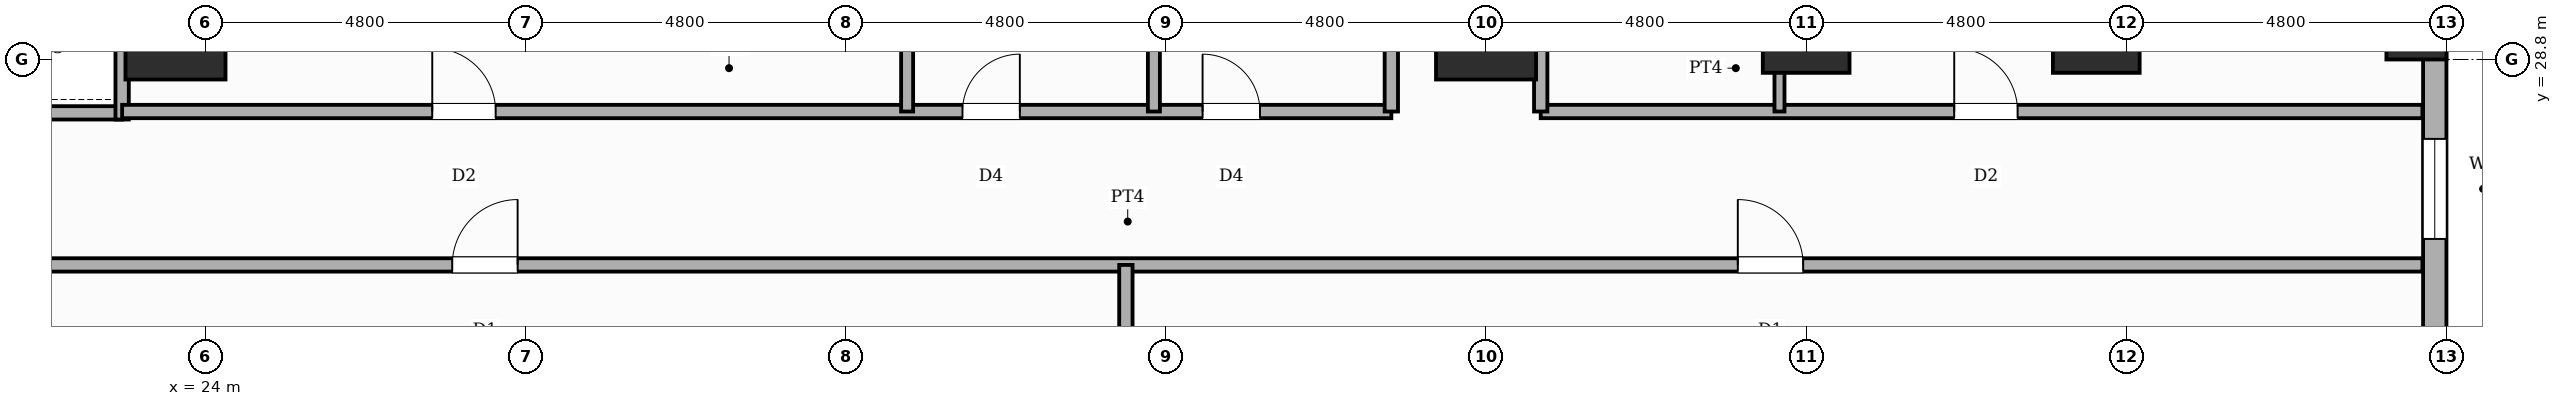
"""IFC4 building model, lengths in metres.
Left out: names, types, materials, properties, quantities, classifications, styles, units other than length and angle.
Written with IfcOpenShell. Run it as: python <this file> out.ifc"""

import sys

from ifc_helpers import new_model, si_unit, direction, frame, frame_2d, origin, origin_2d, place, context, subcontext, project, spatial, rectangle, circle, extrude, element, fill, save


model = new_model("IFC4")
c1 = context("Model", 3, precision=1e-05, world=origin(), true_north=direction((0.0, 1.0)))
c2 = subcontext(c1, "Body", "Model", "MODEL_VIEW")
j1 = project(units=[si_unit("LENGTHUNIT", "METRE"), si_unit("PLANEANGLEUNIT", "RADIAN")], contexts=[c1])
p1 = place(None, origin())
s1 = spatial("IfcSite", under=j1, at=p1, CompositionType="ELEMENT")
p2 = place(p1, origin())
s2 = spatial("IfcBuilding", under=s1, at=p2, CompositionType="ELEMENT")
p3 = place(p2, frame((0.0, 0.0, 14.8)))
s3 = spatial("IfcBuildingStorey", under=s2, at=p3, CompositionType="ELEMENT", Elevation=14.8)
for number, where, z_axis, x_axis in (
    (1, (23.55, 29.25, 0.0), (0.0, 0.0, 1.0), (1.0, 0.0, 0.0)),
    (2, (43.2, 29.25, 0.0), (0.0, 0.0, 1.0), (1.0, 0.0, 0.0)),
):
    element("IfcColumn", number, at=place(p3, frame(where, z_axis=z_axis, x_axis=x_axis)), inside=s3, PredefinedType="USERDEFINED", context=c2, shape_type="SweptSolid", body=[
        extrude(rectangle(XDim=1.5, YDim=1.5, at=origin_2d()), origin(), (0.0, 0.0, 1.0), 4.8),
    ])
for number, where, z_axis, x_axis in (
    (3, (48.0, 29.25, 0.0), (0.0, 0.0, 1.0), (1.0, 0.0, 0.0)),
    (4, (52.35, 29.25, 0.0), (0.0, 0.0, 1.0), (1.0, 0.0, 0.0)),
):
    element("IfcColumn", number, at=place(p3, frame(where, z_axis=z_axis, x_axis=x_axis)), inside=s3, PredefinedType="COLUMN", context=c2, shape_type="SweptSolid", body=[
        extrude(rectangle(XDim=1.3, YDim=1.3, at=origin_2d()), origin(), (0.0, 0.0, 1.0), 4.8),
    ])
p4 = place(p3, frame((57.15, 29.25, 0.0), z_axis=(0.0, 0.0, 1.0), x_axis=(1.0, 0.0, 0.0)))
e5 = element("IfcColumn", 5, at=p4, inside=s3, PredefinedType="COLUMN", context=c2, shape_type="SweptSolid", body=[
    extrude(circle(Radius=0.45, at=origin_2d()), origin(), (0.0, 0.0, 1.0), 4.8),
])
p5 = place(p3, frame((57.425, 48.0, 0.0), z_axis=(0.0, 0.0, 1.0), x_axis=(0.0, -1.0, 0.0)))
e6 = element("IfcWall", 6, at=p5, inside=s3, PredefinedType="STANDARD", context=c2, shape_type="SweptSolid", body=[
    extrude(rectangle(XDim=38.4, YDim=0.35, at=frame_2d((19.2, 0.0))), origin(), (0.0, 0.0, 1.0), 3.48),
])
p6 = place(p5, frame((20.39, 0.0, 0.85)))
e7 = element("IfcOpeningElement", 7, at=p6, cuts=e6, PredefinedType="OPENING", context=c2, shape_type="SweptSolid", body=[
    extrude(rectangle(XDim=1.5, YDim=2.1, at=frame_2d((0.75, 1.05))), frame((0.0, 0.185, 0.0), z_axis=(0.0, -1.0, 0.0), x_axis=(1.0, 0.0, 0.0)), (0.0, 0.0, 1.0), 0.37),
])
p7 = place(p5, frame((2.0, 0.0, 0.85)))
e8 = element("IfcOpeningElement", 8, at=p7, cuts=e6, PredefinedType="OPENING", context=c2, shape_type="SweptSolid", body=[
    extrude(rectangle(XDim=1.5, YDim=2.1, at=frame_2d((0.75, 1.05))), frame((0.0, 0.185, 0.0), z_axis=(0.0, -1.0, 0.0), x_axis=(1.0, 0.0, 0.0)), (0.0, 0.0, 1.0), 0.37),
])
p8 = place(p5, frame((24.585, 0.0, 0.85)))
e9 = element("IfcOpeningElement", 9, at=p8, cuts=e6, PredefinedType="OPENING", context=c2, shape_type="SweptSolid", body=[
    extrude(rectangle(XDim=1.5, YDim=2.1, at=frame_2d((0.75, 1.05))), frame((0.0, 0.185, 0.0), z_axis=(0.0, -1.0, 0.0), x_axis=(1.0, 0.0, 0.0)), (0.0, 0.0, 1.0), 0.37),
])
p9 = place(p3, frame((15.5, 28.0, 0.0), z_axis=(0.0, 0.0, 1.0), x_axis=(1.0, 0.0, 0.0)))
e10 = element("IfcWall", 10, at=p9, inside=s3, PredefinedType="POLYGONAL", context=c2, shape_type="SweptSolid", body=[
    extrude(rectangle(XDim=7.25, YDim=0.2, at=frame_2d((3.625, 0.0))), origin(), (0.0, 0.0, 1.0), 4.4),
])
p10 = place(p3, frame((22.75, 27.9, 0.0), z_axis=(0.0, 0.0, 1.0), x_axis=(0.0, 1.0, 0.0)))
e11 = element("IfcWall", 11, at=p10, inside=s3, PredefinedType="POLYGONAL", context=c2, shape_type="SweptSolid", body=[
    extrude(rectangle(XDim=3.0, YDim=0.2, at=frame_2d((1.5, 0.0))), origin(), (0.0, 0.0, 1.0), 4.4),
])
p11 = place(p3, frame((0.36, 25.72, 0.0), z_axis=(0.0, 0.0, 1.0), x_axis=(1.0, 0.0, 0.0)))
e12 = element("IfcWall", 12, at=p11, inside=s3, PredefinedType="PARTITIONING", context=c2, shape_type="SweptSolid", body=[
    extrude(rectangle(XDim=56.88, YDim=0.2, at=frame_2d((28.44, 0.0))), origin(), (0.0, 0.0, 1.0), 4.4),
])
p12 = place(p11, frame((8.665, 0.0, 0.0)))
e13 = element("IfcOpeningElement", 13, at=p12, cuts=e12, PredefinedType="OPENING", context=c2, shape_type="SweptSolid", body=[
    extrude(rectangle(XDim=0.98, YDim=2.18, at=frame_2d((0.49, 1.09))), frame((0.0, 0.11, 0.0), z_axis=(0.0, -1.0, 0.0), x_axis=(1.0, 0.0, 0.0)), (0.0, 0.0, 1.0), 0.22),
])
p13 = place(p11, frame((27.34, 0.0, 0.0)))
e14 = element("IfcOpeningElement", 14, at=p13, cuts=e12, PredefinedType="OPENING", context=c2, shape_type="SweptSolid", body=[
    extrude(rectangle(XDim=0.98, YDim=2.18, at=frame_2d((0.49, 1.09))), frame((0.0, 0.11, 0.0), z_axis=(0.0, -1.0, 0.0), x_axis=(1.0, 0.0, 0.0)), (0.0, 0.0, 1.0), 0.22),
])
p14 = place(p11, frame((46.615, 0.0, 0.0)))
e15 = element("IfcOpeningElement", 15, at=p14, cuts=e12, PredefinedType="OPENING", context=c2, shape_type="SweptSolid", body=[
    extrude(rectangle(XDim=0.98, YDim=2.18, at=frame_2d((0.49, 1.09))), frame((0.0, 0.11, 0.0), z_axis=(0.0, -1.0, 0.0), x_axis=(1.0, 0.0, 0.0)), (0.0, 0.0, 1.0), 0.22),
])
p15 = place(p3, frame((22.75, 28.02, 0.0), z_axis=(0.0, 0.0, 1.0), x_axis=(1.0, 0.0, 0.0)))
e16 = element("IfcWall", 16, at=p15, inside=s3, PredefinedType="PARTITIONING", context=c2, shape_type="SweptSolid", body=[
    extrude(rectangle(XDim=19.03, YDim=0.2, at=frame_2d((9.515, 0.0))), origin(), (0.0, 0.0, 1.0), 4.4),
])
p16 = place(p15, frame((4.65, 0.0, 0.0)))
e17 = element("IfcOpeningElement", 17, at=p16, cuts=e16, PredefinedType="OPENING", context=c2, shape_type="SweptSolid", body=[
    extrude(rectangle(XDim=0.95, YDim=2.15, at=frame_2d((0.475, 1.075))), frame((0.0, 0.11, 0.0), z_axis=(0.0, -1.0, 0.0), x_axis=(1.0, 0.0, 0.0)), (0.0, 0.0, 1.0), 0.22),
])
p17 = place(p15, frame((12.6, 0.0, 0.0)))
e18 = element("IfcOpeningElement", 18, at=p17, cuts=e16, PredefinedType="OPENING", context=c2, shape_type="SweptSolid", body=[
    extrude(rectangle(XDim=0.86, YDim=2.1, at=frame_2d((0.43, 1.05))), frame((0.0, 0.11, 0.0), z_axis=(0.0, -1.0, 0.0), x_axis=(1.0, 0.0, 0.0)), (0.0, 0.0, 1.0), 0.22),
])
p18 = place(p15, frame((16.2, 0.0, 0.0)))
e19 = element("IfcOpeningElement", 19, at=p18, cuts=e16, PredefinedType="OPENING", context=c2, shape_type="SweptSolid", body=[
    extrude(rectangle(XDim=0.86, YDim=2.1, at=frame_2d((0.43, 1.05))), frame((0.0, 0.11, 0.0), z_axis=(0.0, -1.0, 0.0), x_axis=(1.0, 0.0, 0.0)), (0.0, 0.0, 1.0), 0.22),
])
p19 = place(p3, frame((44.02, 28.02, 0.0), z_axis=(0.0, 0.0, 1.0), x_axis=(1.0, 0.0, 0.0)))
e20 = element("IfcWall", 20, at=p19, inside=s3, PredefinedType="PARTITIONING", context=c2, shape_type="SweptSolid", body=[
    extrude(rectangle(XDim=13.22, YDim=0.2, at=frame_2d((6.61, 0.0))), origin(), (0.0, 0.0, 1.0), 4.4),
])
p20 = place(p19, frame((6.2, 0.0, 0.0)))
e21 = element("IfcOpeningElement", 21, at=p20, cuts=e20, PredefinedType="OPENING", context=c2, shape_type="SweptSolid", body=[
    extrude(rectangle(XDim=0.95, YDim=2.15, at=frame_2d((0.475, 1.075))), frame((0.0, 0.11, 0.0), z_axis=(0.0, -1.0, 0.0), x_axis=(1.0, 0.0, 0.0)), (0.0, 0.0, 1.0), 0.22),
])
p21 = place(p3, frame((41.78, 28.02, 0.0), z_axis=(0.0, 0.0, 1.0), x_axis=(0.0, 1.0, 0.0)))
e22 = element("IfcWall", 22, at=p21, inside=s3, PredefinedType="PARTITIONING", context=c2, shape_type="SweptSolid", body=[
    extrude(rectangle(XDim=10.28, YDim=0.2, at=frame_2d((5.14, 0.0))), origin(), (0.0, 0.0, 1.0), 4.4),
])
p22 = place(p21, frame((9.0, 0.0, 0.0)))
e23 = element("IfcOpeningElement", 23, at=p22, cuts=e22, PredefinedType="OPENING", context=c2, shape_type="SweptSolid", body=[
    extrude(rectangle(XDim=0.95, YDim=2.15, at=frame_2d((0.475, 1.075))), frame((0.0, 0.11, 0.0), z_axis=(0.0, -1.0, 0.0), x_axis=(1.0, 0.0, 0.0)), (0.0, 0.0, 1.0), 0.22),
])
p23 = place(p3, frame((44.02, 28.02, 0.0), z_axis=(0.0, 0.0, 1.0), x_axis=(0.0, 1.0, 0.0)))
e24 = element("IfcWall", 24, at=p23, inside=s3, PredefinedType="PARTITIONING", context=c2, shape_type="SweptSolid", body=[
    extrude(rectangle(XDim=8.1, YDim=0.2, at=frame_2d((4.05, 0.0))), origin(), (0.0, 0.0, 1.0), 4.4),
])
p24 = place(p3, frame((47.6, 28.02, 0.0), z_axis=(0.0, 0.0, 1.0), x_axis=(0.0, 1.0, 0.0)))
e25 = element("IfcWall", 25, at=p24, inside=s3, PredefinedType="PARTITIONING", context=c2, shape_type="SweptSolid", body=[
    extrude(rectangle(XDim=8.1, YDim=0.15, at=frame_2d((4.05, 0.0))), origin(), (0.0, 0.0, 1.0), 4.4),
])
p25 = place(p3, frame((37.8, 9.96, 0.0), z_axis=(0.0, 0.0, 1.0), x_axis=(0.0, 1.0, 0.0)))
e26 = element("IfcWall", 26, at=p25, inside=s3, PredefinedType="SOLIDWALL", context=c2, shape_type="SweptSolid", body=[
    extrude(rectangle(XDim=15.76, YDim=0.2, at=frame_2d((7.88, 0.0))), origin(), (0.0, 0.0, 1.0), 4.4),
])
p26 = place(p3, frame((34.52, 28.02, 0.0), z_axis=(0.0, 0.0, 1.0), x_axis=(0.0, 1.0, 0.0)))
e27 = element("IfcWall", 27, at=p26, inside=s3, PredefinedType="PLUMBINGWALL", context=c2, shape_type="SweptSolid", body=[
    extrude(rectangle(XDim=19.62, YDim=0.18, at=frame_2d((9.81, 0.0))), origin(), (0.0, 0.0, 1.0), 4.4),
])
p27 = place(p3, frame((38.22, 28.02, 0.0), z_axis=(0.0, 0.0, 1.0), x_axis=(0.0, 1.0, 0.0)))
e28 = element("IfcWall", 28, at=p27, inside=s3, PredefinedType="PLUMBINGWALL", context=c2, shape_type="SweptSolid", body=[
    extrude(rectangle(XDim=6.03, YDim=0.18, at=frame_2d((3.015, 0.0))), origin(), (0.0, 0.0, 1.0), 3.48),
])
p28 = place(p6, origin())
e29 = element("IfcWindow", 29, at=p28, inside=s3, PartitioningType="SINGLE_PANEL", PredefinedType="WINDOW", context=c2, shape_type="SweptSolid", body=[
    extrude(rectangle(XDim=1.5, YDim=2.1, at=frame_2d((0.75, 1.05))), frame((0.0, 0.03, 0.0), z_axis=(0.0, -1.0, 0.0), x_axis=(1.0, 0.0, 0.0)), (0.0, 0.0, 1.0), 0.06),
])
fill(e7, e29)
p29 = place(p20, origin())
e30 = element("IfcDoor", 30, at=p29, inside=s3, OperationType="SINGLE_SWING_LEFT", PredefinedType="DOOR", context=c2, shape_type="SweptSolid", body=[
    extrude(rectangle(XDim=0.95, YDim=2.15, at=frame_2d((0.475, 1.075))), frame((0.0, 0.025, 0.0), z_axis=(0.0, -1.0, 0.0), x_axis=(1.0, 0.0, 0.0)), (0.0, 0.0, 1.0), 0.05),
])
fill(e21, e30)
p30 = place(p13, origin())
e31 = element("IfcDoor", 31, at=p30, inside=s3, OperationType="SINGLE_SWING_RIGHT", PredefinedType="DOOR", context=c2, shape_type="SweptSolid", body=[
    extrude(rectangle(XDim=0.98, YDim=2.18, at=frame_2d((0.49, 1.09))), frame((0.0, 0.025, 0.0), z_axis=(0.0, -1.0, 0.0), x_axis=(1.0, 0.0, 0.0)), (0.0, 0.0, 1.0), 0.05),
])
fill(e14, e31)
p31 = place(p14, origin())
e32 = element("IfcDoor", 32, at=p31, inside=s3, OperationType="SINGLE_SWING_LEFT", PredefinedType="DOOR", context=c2, shape_type="SweptSolid", body=[
    extrude(rectangle(XDim=0.98, YDim=2.18, at=frame_2d((0.49, 1.09))), frame((0.0, 0.025, 0.0), z_axis=(0.0, -1.0, 0.0), x_axis=(1.0, 0.0, 0.0)), (0.0, 0.0, 1.0), 0.05),
])
fill(e15, e32)
p32 = place(p16, origin())
e33 = element("IfcDoor", 33, at=p32, inside=s3, OperationType="SINGLE_SWING_LEFT", PredefinedType="DOOR", context=c2, shape_type="SweptSolid", body=[
    extrude(rectangle(XDim=0.95, YDim=2.15, at=frame_2d((0.475, 1.075))), frame((0.0, 0.025, 0.0), z_axis=(0.0, -1.0, 0.0), x_axis=(1.0, 0.0, 0.0)), (0.0, 0.0, 1.0), 0.05),
])
fill(e17, e33)
p33 = place(p17, origin())
e34 = element("IfcDoor", 34, at=p33, inside=s3, OperationType="SINGLE_SWING_RIGHT", PredefinedType="DOOR", context=c2, shape_type="SweptSolid", body=[
    extrude(rectangle(XDim=0.86, YDim=2.1, at=frame_2d((0.43, 1.05))), frame((0.0, 0.025, 0.0), z_axis=(0.0, -1.0, 0.0), x_axis=(1.0, 0.0, 0.0)), (0.0, 0.0, 1.0), 0.05),
])
fill(e18, e34)
p34 = place(p18, origin())
e35 = element("IfcDoor", 35, at=p34, inside=s3, OperationType="SINGLE_SWING_LEFT", PredefinedType="DOOR", context=c2, shape_type="SweptSolid", body=[
    extrude(rectangle(XDim=0.86, YDim=2.1, at=frame_2d((0.43, 1.05))), frame((0.0, 0.025, 0.0), z_axis=(0.0, -1.0, 0.0), x_axis=(1.0, 0.0, 0.0)), (0.0, 0.0, 1.0), 0.05),
])
fill(e19, e35)
save(model, sys.argv[1])
